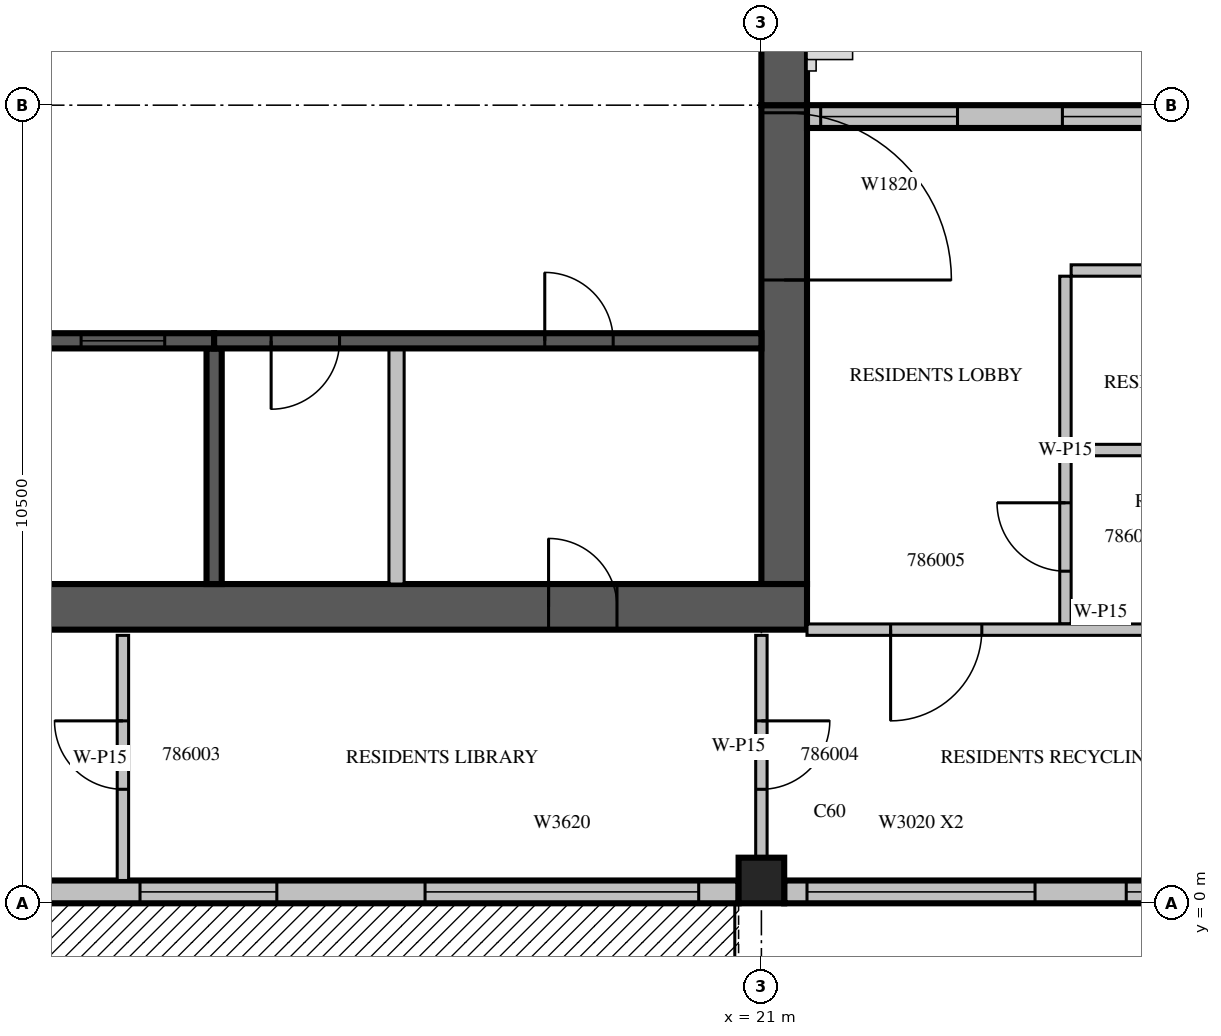
"""IFC4 building model, lengths in metres.
Left out: names, types, materials, properties, quantities, classifications, styles, units other than length and angle.
Written with IfcOpenShell. Run it as: python <this file> out.ifc"""

import sys

from ifc_helpers import new_model, si_unit, direction, frame, frame_2d, origin, origin_2d, place, context, subcontext, project, spatial, rectangle, extrude, source, transform, mapped, element, fill, save


model = new_model("IFC4")
c1 = context("Model", 3, precision=1e-05, world=origin(), true_north=direction((0.0, 1.0)))
c2 = subcontext(c1, "Body", "Model", "MODEL_VIEW")
j1 = project(units=[si_unit("LENGTHUNIT", "METRE"), si_unit("PLANEANGLEUNIT", "RADIAN")], contexts=[c1])
p1 = place(None, origin())
s1 = spatial("IfcSite", under=j1, at=p1, CompositionType="ELEMENT")
p2 = place(p1, origin())
s2 = spatial("IfcBuilding", under=s1, at=p2, CompositionType="ELEMENT")
p3 = place(p2, frame((0.0, 0.0, 361.5)))
s3 = spatial("IfcBuildingStorey", under=s2, at=p3, CompositionType="ELEMENT", Elevation=361.5)
m1 = source(origin(), c2, "Body", "SweptSolid", [
    extrude(rectangle(XDim=0.6, YDim=0.6, at=origin_2d()), origin(), (0.0, 0.0, 1.0), 3.5),
])
p4 = place(p3, frame((21.0, 0.3, 0.0), z_axis=(0.0, 0.0, 1.0), x_axis=(1.0, 0.0, 0.0)))
e1 = element("IfcColumn", 1, at=p4, inside=s3, PredefinedType="COLUMN", context=c2, shape_type="MappedRepresentation", body=[
    mapped(m1, transform((0.0, 0.0, 0.0), scale=1.0)),
])
m2 = source(origin(), c2, "Body", "SweptSolid", [
    extrude(rectangle(XDim=6.3, YDim=0.6, at=frame_2d((3.15, 0.0))), origin(), (0.0, 0.0, 1.0), 3.5),
])
p5 = place(p3, frame((21.3, 4.2, 0.0), z_axis=(0.0, 0.0, 1.0), x_axis=(0.0, 1.0, 0.0)))
e2 = element("IfcWall", 2, at=p5, inside=s3, PredefinedType="SHEAR", context=c2, shape_type="MappedRepresentation", body=[
    mapped(m2, transform((0.0, 0.0, 0.0), scale=1.0)),
])
m3 = source(origin(), c2, "Body", "SweptSolid", [
    extrude(rectangle(XDim=2.2, YDim=2.1, at=frame_2d((1.1, 1.05))), frame((0.0, 0.31, 0.0), z_axis=(0.0, -1.0, 0.0), x_axis=(1.0, 0.0, 0.0)), (0.0, 0.0, 1.0), 0.62),
])
p6 = place(p5, frame((4.0, 0.0, 0.0)))
e3 = element("IfcOpeningElement", 3, at=p6, cuts=e2, PredefinedType="OPENING", context=c2, shape_type="MappedRepresentation", body=[
    mapped(m3, transform((0.0, 0.0, 0.0), scale=1.0)),
])
m4 = source(origin(), c2, "Body", "SweptSolid", [
    extrude(rectangle(XDim=17.4, YDim=0.6, at=frame_2d((8.7, 0.0))), origin(), (0.0, 0.0, 1.0), 3.5),
])
p7 = place(p3, frame((4.2, 3.9, 0.0), z_axis=(0.0, 0.0, 1.0), x_axis=(1.0, 0.0, 0.0)))
e4 = element("IfcWall", 4, at=p7, inside=s3, PredefinedType="SHEAR", context=c2, shape_type="MappedRepresentation", body=[
    mapped(m4, transform((0.0, 0.0, 0.0), scale=1.0)),
])
m5 = source(origin(), c2, "Body", "SweptSolid", [
    extrude(rectangle(XDim=0.9, YDim=2.1, at=frame_2d((0.45, 1.05))), frame((0.0, 0.31, 0.0), z_axis=(0.0, -1.0, 0.0), x_axis=(1.0, 0.0, 0.0)), (0.0, 0.0, 1.0), 0.62),
])
p8 = place(p7, frame((14.0, 0.0, 0.0)))
e5 = element("IfcOpeningElement", 5, at=p8, cuts=e4, PredefinedType="OPENING", context=c2, shape_type="MappedRepresentation", body=[
    mapped(m5, transform((0.0, 0.0, 0.0), scale=1.0)),
])
m6 = source(origin(), c2, "Body", "SweptSolid", [
    extrude(rectangle(XDim=10.5, YDim=0.6, at=frame_2d((5.25, 0.0))), origin(), (0.0, 0.0, 1.0), 3.5),
])
p9 = place(p3, frame((21.3, 10.5, 0.0), z_axis=(0.0, 0.0, 1.0), x_axis=(0.0, 1.0, 0.0)))
e6 = element("IfcWall", 6, at=p9, inside=s3, PredefinedType="SHEAR", context=c2, shape_type="MappedRepresentation", body=[
    mapped(m6, transform((0.0, 0.0, 0.0), scale=1.0)),
])
m7 = source(origin(), c2, "Body", "SweptSolid", [
    extrude(rectangle(XDim=1.2, YDim=2.4, at=frame_2d((0.6, 1.2))), frame((0.0, 0.31, 0.0), z_axis=(0.0, -1.0, 0.0), x_axis=(1.0, 0.0, 0.0)), (0.0, 0.0, 1.0), 0.62),
])
p10 = place(p9, frame((5.7, 0.0, 0.6)))
e7 = element("IfcOpeningElement", 7, at=p10, cuts=e6, PredefinedType="OPENING", context=c2, shape_type="MappedRepresentation", body=[
    mapped(m7, transform((0.0, 0.0, 0.0), scale=1.0)),
])
m8 = source(origin(), c2, "Body", "SweptSolid", [
    extrude(rectangle(XDim=9.9, YDim=0.3, at=frame_2d((4.95, 0.0))), origin(), (0.0, 0.0, 1.0), 3.1),
])
p11 = place(p3, frame((10.8, 0.15, 0.0), z_axis=(0.0, 0.0, 1.0), x_axis=(1.0, 0.0, 0.0)))
e8 = element("IfcWall", 8, at=p11, inside=s3, PredefinedType="STANDARD", context=c2, shape_type="MappedRepresentation", body=[
    mapped(m8, transform((0.0, 0.0, 0.0), scale=1.0)),
])
m9 = source(origin(), c2, "Body", "SweptSolid", [
    extrude(rectangle(XDim=1.8, YDim=2.4, at=frame_2d((0.9, 1.2))), frame((0.0, 0.16, 0.0), z_axis=(0.0, -1.0, 0.0), x_axis=(1.0, 0.0, 0.0)), (0.0, 0.0, 1.0), 0.32),
])
p12 = place(p11, frame((2.025, 0.0, 0.0)))
e9 = element("IfcOpeningElement", 9, at=p12, cuts=e8, PredefinedType="OPENING", context=c2, shape_type="MappedRepresentation", body=[
    mapped(m9, transform((0.0, 0.0, 0.0), scale=1.0)),
])
m10 = source(origin(), c2, "Body", "SweptSolid", [
    extrude(rectangle(XDim=3.6, YDim=2.0, at=frame_2d((1.8, 1.0))), frame((0.0, 0.16, 0.0), z_axis=(0.0, -1.0, 0.0), x_axis=(1.0, 0.0, 0.0)), (0.0, 0.0, 1.0), 0.32),
])
p13 = place(p11, frame((5.775, 0.0, 0.6)))
e10 = element("IfcOpeningElement", 10, at=p13, cuts=e8, PredefinedType="OPENING", context=c2, shape_type="MappedRepresentation", body=[
    mapped(m10, transform((0.0, 0.0, 0.0), scale=1.0)),
])
m11 = source(origin(), c2, "Body", "SweptSolid", [
    extrude(rectangle(XDim=7.8, YDim=0.3, at=frame_2d((3.9, 0.0))), origin(), (0.0, 0.0, 1.0), 3.1),
])
p14 = place(p3, frame((21.3, 0.15, 0.0), z_axis=(0.0, 0.0, 1.0), x_axis=(1.0, 0.0, 0.0)))
e11 = element("IfcWall", 11, at=p14, inside=s3, PredefinedType="STANDARD", context=c2, shape_type="MappedRepresentation", body=[
    mapped(m11, transform((0.0, 0.0, 0.0), scale=1.0)),
])
m12 = source(origin(), c2, "Body", "SweptSolid", [
    extrude(rectangle(XDim=3.0, YDim=2.0, at=frame_2d((1.5, 1.0))), frame((0.0, 0.16, 0.0), z_axis=(0.0, -1.0, 0.0), x_axis=(1.0, 0.0, 0.0)), (0.0, 0.0, 1.0), 0.32),
])
p15 = place(p14, frame((0.3, 0.0, 0.6)))
e12 = element("IfcOpeningElement", 12, at=p15, cuts=e11, PredefinedType="OPENING", context=c2, shape_type="MappedRepresentation", body=[
    mapped(m12, transform((0.0, 0.0, 0.0), scale=1.0)),
])
p16 = place(p14, frame((4.5, 0.0, 0.6)))
e13 = element("IfcOpeningElement", 13, at=p16, cuts=e11, PredefinedType="OPENING", context=c2, shape_type="MappedRepresentation", body=[
    mapped(m12, transform((0.0, 0.0, 0.0), scale=1.0)),
])
m13 = source(origin(), c2, "Body", "SweptSolid", [
    extrude(rectangle(XDim=7.5, YDim=0.3, at=frame_2d((3.75, 0.0))), origin(), (0.0, 0.0, 1.0), 3.1),
])
p17 = place(p3, frame((29.1, 10.35, 0.0), z_axis=(0.0, 0.0, 1.0), x_axis=(-1.0, 0.0, 0.0)))
e14 = element("IfcWall", 14, at=p17, inside=s3, PredefinedType="STANDARD", context=c2, shape_type="MappedRepresentation", body=[
    mapped(m13, transform((0.0, 0.0, 0.0), scale=1.0)),
])
p18 = place(p17, frame((1.14, 0.0, 0.6)))
e15 = element("IfcOpeningElement", 15, at=p18, cuts=e14, PredefinedType="OPENING", context=c2, shape_type="MappedRepresentation", body=[
    mapped(m12, transform((0.0, 0.0, 0.0), scale=1.0)),
])
m14 = source(origin(), c2, "Body", "SweptSolid", [
    extrude(rectangle(XDim=1.8, YDim=2.0, at=frame_2d((0.9, 1.0))), frame((0.0, 0.16, 0.0), z_axis=(0.0, -1.0, 0.0), x_axis=(1.0, 0.0, 0.0)), (0.0, 0.0, 1.0), 0.32),
])
p19 = place(p17, frame((5.52, 0.0, 0.6)))
e16 = element("IfcOpeningElement", 16, at=p19, cuts=e14, PredefinedType="OPENING", context=c2, shape_type="MappedRepresentation", body=[
    mapped(m14, transform((0.0, 0.0, 0.0), scale=1.0)),
])
m15 = source(origin(), c2, "Body", "SweptSolid", [
    extrude(rectangle(XDim=3.1, YDim=0.2, at=frame_2d((1.55, 0.0))), origin(), (0.0, 0.0, 1.0), 3.1),
])
p20 = place(p3, frame((13.8, 4.2, 0.0), z_axis=(0.0, 0.0, 1.0), x_axis=(0.0, 1.0, 0.0)))
e17 = element("IfcWall", 17, at=p20, inside=s3, PredefinedType="SOLIDWALL", context=c2, shape_type="MappedRepresentation", body=[
    mapped(m15, transform((0.0, 0.0, 0.0), scale=1.0)),
])
m16 = source(origin(), c2, "Body", "SweptSolid", [
    extrude(rectangle(XDim=3.1, YDim=0.2, at=frame_2d((1.55, 0.0))), origin(), (0.0, 0.0, 1.0), 3.1),
])
p21 = place(p3, frame((16.2, 4.2, 0.0), z_axis=(0.0, 0.0, 1.0), x_axis=(0.0, 1.0, 0.0)))
e18 = element("IfcWall", 18, at=p21, inside=s3, PredefinedType="PARTITIONING", context=c2, shape_type="MappedRepresentation", body=[
    mapped(m16, transform((0.0, 0.0, 0.0), scale=1.0)),
])
m17 = source(origin(), c2, "Body", "SweptSolid", [
    extrude(rectangle(XDim=9.6, YDim=0.2, at=frame_2d((4.8, 0.0))), origin(), (0.0, 0.0, 1.0), 3.5),
])
p22 = place(p3, frame((4.2, 7.4, 0.0), z_axis=(0.0, 0.0, 1.0), x_axis=(1.0, 0.0, 0.0)))
e19 = element("IfcWall", 19, at=p22, inside=s3, PredefinedType="SOLIDWALL", context=c2, shape_type="MappedRepresentation", body=[
    mapped(m17, transform((0.0, 0.0, 0.0), scale=1.0)),
])
m18 = source(origin(), c2, "Body", "SweptSolid", [
    extrude(rectangle(XDim=1.1, YDim=2.1, at=frame_2d((0.55, 1.05))), frame((0.0, 0.11, 0.0), z_axis=(0.0, -1.0, 0.0), x_axis=(1.0, 0.0, 0.0)), (0.0, 0.0, 1.0), 0.22),
])
p23 = place(p22, frame((0.65, 0.0, 0.0)))
e20 = element("IfcOpeningElement", 20, at=p23, cuts=e19, PredefinedType="OPENING", context=c2, shape_type="MappedRepresentation", body=[
    mapped(m18, transform((0.0, 0.0, 0.0), scale=1.0)),
])
p24 = place(p22, frame((3.05, 0.0, 0.0)))
e21 = element("IfcOpeningElement", 21, at=p24, cuts=e19, PredefinedType="OPENING", context=c2, shape_type="MappedRepresentation", body=[
    mapped(m18, transform((0.0, 0.0, 0.0), scale=1.0)),
])
p25 = place(p22, frame((5.45, 0.0, 0.0)))
e22 = element("IfcOpeningElement", 22, at=p25, cuts=e19, PredefinedType="OPENING", context=c2, shape_type="MappedRepresentation", body=[
    mapped(m18, transform((0.0, 0.0, 0.0), scale=1.0)),
])
p26 = place(p22, frame((7.85, 0.0, 0.0)))
e23 = element("IfcOpeningElement", 23, at=p26, cuts=e19, PredefinedType="OPENING", context=c2, shape_type="MappedRepresentation", body=[
    mapped(m18, transform((0.0, 0.0, 0.0), scale=1.0)),
])
m19 = source(origin(), c2, "Body", "SweptSolid", [
    extrude(rectangle(XDim=7.2, YDim=0.2, at=frame_2d((3.6, 0.0))), origin(), (0.0, 0.0, 1.0), 3.1),
])
p27 = place(p3, frame((13.8, 7.4, 0.0), z_axis=(0.0, 0.0, 1.0), x_axis=(1.0, 0.0, 0.0)))
e24 = element("IfcWall", 24, at=p27, inside=s3, PredefinedType="SOLIDWALL", context=c2, shape_type="MappedRepresentation", body=[
    mapped(m19, transform((0.0, 0.0, 0.0), scale=1.0)),
])
m20 = source(origin(), c2, "Body", "SweptSolid", [
    extrude(rectangle(XDim=0.9, YDim=2.1, at=frame_2d((0.45, 1.05))), frame((0.0, 0.11, 0.0), z_axis=(0.0, -1.0, 0.0), x_axis=(1.0, 0.0, 0.0)), (0.0, 0.0, 1.0), 0.22),
])
p28 = place(p27, frame((0.75, 0.0, 0.0)))
e25 = element("IfcOpeningElement", 25, at=p28, cuts=e24, PredefinedType="OPENING", context=c2, shape_type="MappedRepresentation", body=[
    mapped(m20, transform((0.0, 0.0, 0.0), scale=1.0)),
])
p29 = place(p27, frame((4.35, 0.0, 0.0)))
e26 = element("IfcOpeningElement", 26, at=p29, cuts=e24, PredefinedType="OPENING", context=c2, shape_type="MappedRepresentation", body=[
    mapped(m20, transform((0.0, 0.0, 0.0), scale=1.0)),
])
m21 = source(origin(), c2, "Body", "SweptSolid", [
    extrude(rectangle(XDim=4.575, YDim=0.15, at=frame_2d((2.288, 0.0))), origin(), (0.0, 0.0, 1.0), 3.1),
])
p30 = place(p3, frame((25.0, 8.25, 0.0), z_axis=(0.0, 0.0, 1.0), x_axis=(0.0, -1.0, 0.0)))
e27 = element("IfcWall", 27, at=p30, inside=s3, PredefinedType="PARTITIONING", context=c2, shape_type="MappedRepresentation", body=[
    mapped(m21, transform((0.0, 0.0, 0.0), scale=1.0)),
])
m22 = source(origin(), c2, "Body", "SweptSolid", [
    extrude(rectangle(XDim=0.9, YDim=2.1, at=frame_2d((0.45, 1.05))), frame((0.0, 0.085, 0.0), z_axis=(0.0, -1.0, 0.0), x_axis=(1.0, 0.0, 0.0)), (0.0, 0.0, 1.0), 0.17),
])
p31 = place(p30, frame((2.981, 0.0, 0.0)))
e28 = element("IfcOpeningElement", 28, at=p31, cuts=e27, PredefinedType="OPENING", context=c2, shape_type="MappedRepresentation", body=[
    mapped(m22, transform((0.0, 0.0, 0.0), scale=1.0)),
])
m23 = source(origin(), c2, "Body", "SweptSolid", [
    extrude(rectangle(XDim=4.25, YDim=0.15, at=frame_2d((2.125, 0.0))), origin(), (0.0, 0.0, 1.0), 3.1),
])
p32 = place(p3, frame((29.325, 8.325, 0.0), z_axis=(0.0, 0.0, 1.0), x_axis=(-1.0, 0.0, 0.0)))
e29 = element("IfcWall", 29, at=p32, inside=s3, PredefinedType="PARTITIONING", context=c2, shape_type="MappedRepresentation", body=[
    mapped(m23, transform((0.0, 0.0, 0.0), scale=1.0)),
])
m24 = source(origin(), c2, "Body", "SweptSolid", [
    extrude(rectangle(XDim=1.0, YDim=2.1, at=frame_2d((0.5, 1.05))), frame((0.0, 0.085, 0.0), z_axis=(0.0, -1.0, 0.0), x_axis=(1.0, 0.0, 0.0)), (0.0, 0.0, 1.0), 0.17),
])
p33 = place(p32, frame((1.625, 0.0, 0.0)))
e30 = element("IfcOpeningElement", 30, at=p33, cuts=e29, PredefinedType="OPENING", context=c2, shape_type="MappedRepresentation", body=[
    mapped(m24, transform((0.0, 0.0, 0.0), scale=1.0)),
])
p34 = place(p3, frame((29.325, 5.963, 0.0), z_axis=(0.0, 0.0, 1.0), x_axis=(-1.0, 0.0, 0.0)))
e31 = element("IfcWall", 31, at=p34, inside=s3, PredefinedType="PARTITIONING", context=c2, shape_type="MappedRepresentation", body=[
    mapped(m23, transform((0.0, 0.0, 0.0), scale=1.0)),
])
m25 = source(origin(), c2, "Body", "SweptSolid", [
    extrude(rectangle(XDim=3.225, YDim=0.15, at=frame_2d((1.613, 0.0))), origin(), (0.0, 0.0, 1.0), 3.1),
])
p35 = place(p3, frame((12.6, 3.525, 0.0), z_axis=(0.0, 0.0, 1.0), x_axis=(0.0, -1.0, 0.0)))
e32 = element("IfcWall", 32, at=p35, inside=s3, PredefinedType="PARTITIONING", context=c2, shape_type="MappedRepresentation", body=[
    mapped(m25, transform((0.0, 0.0, 0.0), scale=1.0)),
])
p36 = place(p35, frame((1.125, 0.0, 0.0)))
e33 = element("IfcOpeningElement", 33, at=p36, cuts=e32, PredefinedType="OPENING", context=c2, shape_type="MappedRepresentation", body=[
    mapped(m22, transform((0.0, 0.0, 0.0), scale=1.0)),
])
m26 = source(origin(), c2, "Body", "SweptSolid", [
    extrude(rectangle(XDim=2.926, YDim=0.15, at=frame_2d((1.463, 0.0))), origin(), (0.0, 0.0, 1.0), 3.1),
])
p37 = place(p3, frame((21.0, 3.525, 0.0), z_axis=(0.0, 0.0, 1.0), x_axis=(0.0, -1.0, 0.0)))
e34 = element("IfcWall", 34, at=p37, inside=s3, PredefinedType="PARTITIONING", context=c2, shape_type="MappedRepresentation", body=[
    mapped(m26, transform((0.0, 0.0, 0.0), scale=1.0)),
])
p38 = place(p37, frame((1.125, 0.0, 0.0)))
e35 = element("IfcOpeningElement", 35, at=p38, cuts=e34, PredefinedType="OPENING", context=c2, shape_type="MappedRepresentation", body=[
    mapped(m22, transform((0.0, 0.0, 0.0), scale=1.0)),
])
m27 = source(origin(), c2, "Body", "SweptSolid", [
    extrude(rectangle(XDim=7.725, YDim=0.15, at=frame_2d((3.862, 0.0))), origin(), (0.0, 0.0, 1.0), 3.1),
])
p39 = place(p3, frame((21.6, 3.6, 0.0), z_axis=(0.0, 0.0, 1.0), x_axis=(1.0, 0.0, 0.0)))
e36 = element("IfcWall", 36, at=p39, inside=s3, PredefinedType="PARTITIONING", context=c2, shape_type="MappedRepresentation", body=[
    mapped(m27, transform((0.0, 0.0, 0.0), scale=1.0)),
])
m28 = source(origin(), c2, "Body", "SweptSolid", [
    extrude(rectangle(XDim=1.2, YDim=2.1, at=frame_2d((0.6, 1.05))), frame((0.0, 0.085, 0.0), z_axis=(0.0, -1.0, 0.0), x_axis=(1.0, 0.0, 0.0)), (0.0, 0.0, 1.0), 0.17),
])
p40 = place(p39, frame((1.1, 0.0, 0.0)))
e37 = element("IfcOpeningElement", 37, at=p40, cuts=e36, PredefinedType="OPENING", context=c2, shape_type="MappedRepresentation", body=[
    mapped(m28, transform((0.0, 0.0, 0.0), scale=1.0)),
])
m29 = source(origin(), c2, "Body", "SweptSolid", [
    extrude(rectangle(XDim=1.8, YDim=2.4, at=frame_2d((0.9, 1.2))), frame((0.0, 0.025, 0.0), z_axis=(0.0, -1.0, 0.0), x_axis=(1.0, 0.0, 0.0)), (0.0, 0.0, 1.0), 0.05),
])
p41 = place(p12, origin())
e38 = element("IfcDoor", 38, at=p41, inside=s3, OperationType="SLIDING_TO_LEFT", PredefinedType="DOOR", context=c2, shape_type="MappedRepresentation", body=[
    mapped(m29, transform((0.0, 0.0, 0.0), scale=1.0)),
])
fill(e9, e38)
m30 = source(origin(), c2, "Body", "SweptSolid", [
    extrude(rectangle(XDim=3.6, YDim=2.0, at=frame_2d((1.8, 1.0))), frame((0.0, 0.03, 0.0), z_axis=(0.0, -1.0, 0.0), x_axis=(1.0, 0.0, 0.0)), (0.0, 0.0, 1.0), 0.06),
])
p42 = place(p13, origin())
e39 = element("IfcWindow", 39, at=p42, inside=s3, PartitioningType="SINGLE_PANEL", PredefinedType="WINDOW", context=c2, shape_type="MappedRepresentation", body=[
    mapped(m30, transform((0.0, 0.0, 0.0), scale=1.0)),
])
fill(e10, e39)
m31 = source(origin(), c2, "Body", "SweptSolid", [
    extrude(rectangle(XDim=3.0, YDim=2.0, at=frame_2d((1.5, 1.0))), frame((0.0, 0.03, 0.0), z_axis=(0.0, -1.0, 0.0), x_axis=(1.0, 0.0, 0.0)), (0.0, 0.0, 1.0), 0.06),
])
p43 = place(p15, origin())
e40 = element("IfcWindow", 40, at=p43, inside=s3, PartitioningType="SINGLE_PANEL", PredefinedType="WINDOW", context=c2, shape_type="MappedRepresentation", body=[
    mapped(m31, transform((0.0, 0.0, 0.0), scale=1.0)),
])
fill(e12, e40)
p44 = place(p16, origin())
e41 = element("IfcWindow", 41, at=p44, inside=s3, PartitioningType="SINGLE_PANEL", PredefinedType="WINDOW", context=c2, shape_type="MappedRepresentation", body=[
    mapped(m31, transform((0.0, 0.0, 0.0), scale=1.0)),
])
fill(e13, e41)
p45 = place(p18, origin())
e42 = element("IfcWindow", 42, at=p45, inside=s3, PartitioningType="SINGLE_PANEL", PredefinedType="WINDOW", context=c2, shape_type="MappedRepresentation", body=[
    mapped(m31, transform((0.0, 0.0, 0.0), scale=1.0)),
])
fill(e15, e42)
m32 = source(origin(), c2, "Body", "SweptSolid", [
    extrude(rectangle(XDim=1.8, YDim=2.0, at=frame_2d((0.9, 1.0))), frame((0.0, 0.03, 0.0), z_axis=(0.0, -1.0, 0.0), x_axis=(1.0, 0.0, 0.0)), (0.0, 0.0, 1.0), 0.06),
])
p46 = place(p19, origin())
e43 = element("IfcWindow", 43, at=p46, inside=s3, PartitioningType="SINGLE_PANEL", PredefinedType="WINDOW", context=c2, shape_type="MappedRepresentation", body=[
    mapped(m32, transform((0.0, 0.0, 0.0), scale=1.0)),
])
fill(e16, e43)
m33 = source(origin(), c2, "Body", "SweptSolid", [
    extrude(rectangle(XDim=1.1, YDim=2.1, at=frame_2d((0.55, 1.05))), frame((0.0, 0.025, 0.0), z_axis=(0.0, -1.0, 0.0), x_axis=(1.0, 0.0, 0.0)), (0.0, 0.0, 1.0), 0.05),
])
p47 = place(p26, origin())
e44 = element("IfcDoor", 44, at=p47, inside=s3, OperationType="SLIDING_TO_LEFT", PredefinedType="DOOR", context=c2, shape_type="MappedRepresentation", body=[
    mapped(m33, transform((0.0, 0.0, 0.0), scale=1.0)),
])
fill(e23, e44)
m34 = source(origin(), c2, "Body", "SweptSolid", [
    extrude(rectangle(XDim=0.9, YDim=2.1, at=frame_2d((0.45, 1.05))), frame((0.0, 0.025, 0.0), z_axis=(0.0, -1.0, 0.0), x_axis=(1.0, 0.0, 0.0)), (0.0, 0.0, 1.0), 0.05),
])
p48 = place(p28, origin())
e45 = element("IfcDoor", 45, at=p48, inside=s3, OperationType="SINGLE_SWING_RIGHT", PredefinedType="DOOR", context=c2, shape_type="MappedRepresentation", body=[
    mapped(m34, transform((0.0, 0.0, 0.0), scale=1.0)),
])
fill(e25, e45)
p49 = place(p29, origin())
e46 = element("IfcDoor", 46, at=p49, inside=s3, OperationType="SINGLE_SWING_LEFT", PredefinedType="DOOR", context=c2, shape_type="MappedRepresentation", body=[
    mapped(m34, transform((0.0, 0.0, 0.0), scale=1.0)),
])
fill(e26, e46)
m35 = source(origin(), c2, "Body", "SweptSolid", [
    extrude(rectangle(XDim=2.2, YDim=2.1, at=frame_2d((1.1, 1.05))), frame((0.0, 0.025, 0.0), z_axis=(0.0, -1.0, 0.0), x_axis=(1.0, 0.0, 0.0)), (0.0, 0.0, 1.0), 0.05),
])
p50 = place(p6, origin())
e47 = element("IfcDoor", 47, at=p50, inside=s3, OperationType="DOUBLE_DOOR_SINGLE_SWING", PredefinedType="DOOR", context=c2, shape_type="MappedRepresentation", body=[
    mapped(m35, transform((0.0, 0.0, 0.0), scale=1.0)),
])
fill(e3, e47)
p51 = place(p8, origin())
e48 = element("IfcDoor", 48, at=p51, inside=s3, OperationType="SINGLE_SWING_LEFT", PredefinedType="DOOR", context=c2, shape_type="MappedRepresentation", body=[
    mapped(m34, transform((0.0, 0.0, 0.0), scale=1.0)),
])
fill(e5, e48)
p52 = place(p31, origin())
e49 = element("IfcDoor", 49, at=p52, inside=s3, OperationType="SINGLE_SWING_RIGHT", PredefinedType="DOOR", context=c2, shape_type="MappedRepresentation", body=[
    mapped(m34, transform((0.0, 0.0, 0.0), scale=1.0)),
])
fill(e28, e49)
p53 = place(p36, origin())
e50 = element("IfcDoor", 50, at=p53, inside=s3, OperationType="SINGLE_SWING_RIGHT", PredefinedType="DOOR", context=c2, shape_type="MappedRepresentation", body=[
    mapped(m34, transform((0.0, 0.0, 0.0), scale=1.0)),
])
fill(e33, e50)
p54 = place(p38, origin())
e51 = element("IfcDoor", 51, at=p54, inside=s3, OperationType="SINGLE_SWING_LEFT", PredefinedType="DOOR", context=c2, shape_type="MappedRepresentation", body=[
    mapped(m34, transform((0.0, 0.0, 0.0), scale=1.0)),
])
fill(e35, e51)
m36 = source(origin(), c2, "Body", "SweptSolid", [
    extrude(rectangle(XDim=1.2, YDim=2.1, at=frame_2d((0.6, 1.05))), frame((0.0, 0.025, 0.0), z_axis=(0.0, -1.0, 0.0), x_axis=(1.0, 0.0, 0.0)), (0.0, 0.0, 1.0), 0.05),
])
p55 = place(p40, origin())
e52 = element("IfcDoor", 52, at=p55, inside=s3, OperationType="SINGLE_SWING_RIGHT", PredefinedType="DOOR", context=c2, shape_type="MappedRepresentation", body=[
    mapped(m36, transform((0.0, 0.0, 0.0), scale=1.0)),
])
fill(e37, e52)
save(model, sys.argv[1])
